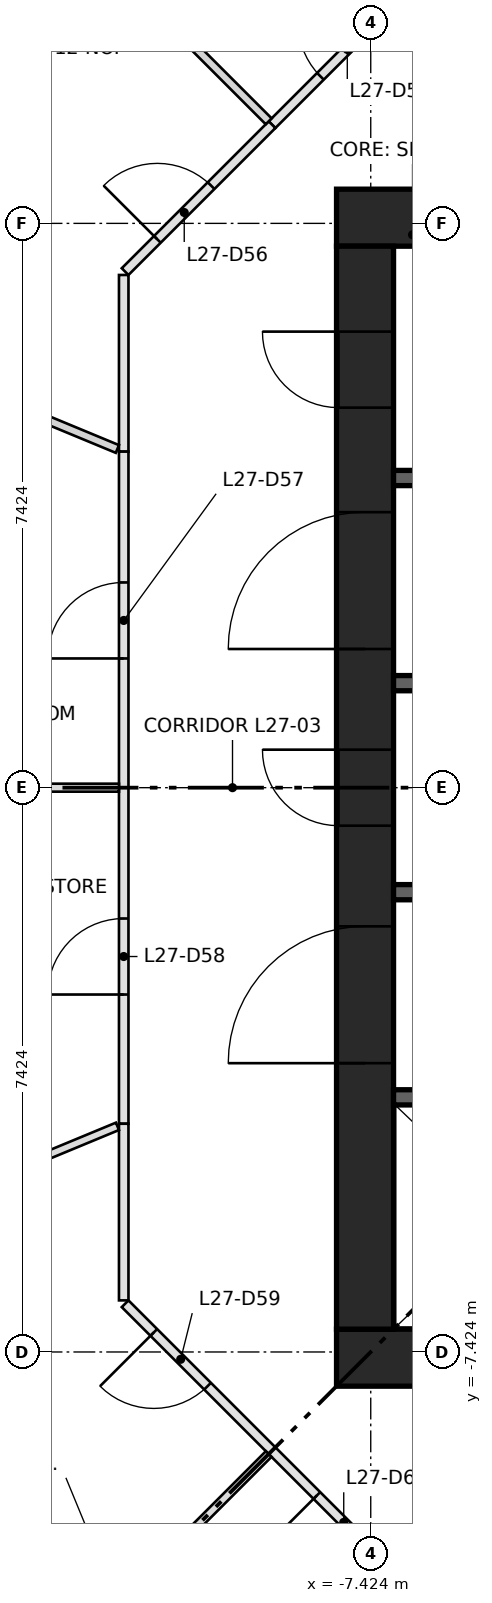
"""IFC4 building model, lengths in metres.
Left out: names, types, materials, properties, quantities, classifications, styles, units other than length and angle.
Written with IfcOpenShell. Run it as: python <this file> out.ifc"""

import sys

from ifc_helpers import new_model, si_unit, direction, frame, frame_2d, origin, place, context, subcontext, project, spatial, rectangle, extrude, element, fill, save


model = new_model("IFC4")
c1 = context("Model", 3, precision=1e-05, world=origin(), true_north=direction((0.0, 1.0)))
c2 = subcontext(c1, "Body", "Model", "MODEL_VIEW")
j1 = project(units=[si_unit("LENGTHUNIT", "METRE"), si_unit("PLANEANGLEUNIT", "RADIAN")], contexts=[c1])
p1 = place(None, origin())
s1 = spatial("IfcSite", under=j1, at=p1, CompositionType="ELEMENT")
p2 = place(p1, origin())
s2 = spatial("IfcBuilding", under=s1, at=p2, CompositionType="ELEMENT")
p3 = place(p2, frame((0.0, 0.0, 105.6)))
s3 = spatial("IfcBuildingStorey", under=s2, at=p3, CompositionType="ELEMENT", Elevation=105.6)
for number, where, z_axis, x_axis in (
    (1, (-7.874, -7.499, 0.0), (0.0, 0.0, 1.0), (1.0, 0.0, 0.0)),
    (2, (-7.874, 7.499, 0.0), (0.0, 0.0, 1.0), (1.0, 0.0, 0.0)),
):
    element("IfcWall", number, at=place(p3, frame(where, z_axis=z_axis, x_axis=x_axis)), inside=s3, PredefinedType="SHEAR", context=c2, shape_type="SweptSolid", body=[
        extrude(rectangle(XDim=15.748, YDim=0.75, at=frame_2d((7.874, 0.0))), origin(), (0.0, 0.0, 1.0), 3.65),
    ])
p4 = place(p3, frame((-7.499, -7.124, 0.0), z_axis=(0.0, 0.0, 1.0), x_axis=(0.0, 1.0, 0.0)))
e3 = element("IfcWall", 3, at=p4, inside=s3, PredefinedType="SHEAR", context=c2, shape_type="SweptSolid", body=[
    extrude(rectangle(XDim=14.248, YDim=0.75, at=frame_2d((7.124, 0.0))), origin(), (0.0, 0.0, 1.0), 3.65),
])
p5 = place(p4, frame((6.624, 0.0, 0.0)))
e4 = element("IfcOpeningElement", 4, at=p5, cuts=e3, PredefinedType="OPENING", context=c2, shape_type="SweptSolid", body=[
    extrude(rectangle(XDim=1.0, YDim=2.1, at=frame_2d((0.5, 1.05))), frame((0.0, 0.385, 0.0), z_axis=(0.0, -1.0, 0.0), x_axis=(1.0, 0.0, 0.0)), (0.0, 0.0, 1.0), 0.77),
])
p6 = place(p4, frame((3.5, 0.0, 0.0)))
e5 = element("IfcOpeningElement", 5, at=p6, cuts=e3, PredefinedType="OPENING", context=c2, shape_type="SweptSolid", body=[
    extrude(rectangle(XDim=1.8, YDim=2.1, at=frame_2d((0.9, 1.05))), frame((0.0, 0.385, 0.0), z_axis=(0.0, -1.0, 0.0), x_axis=(1.0, 0.0, 0.0)), (0.0, 0.0, 1.0), 0.77),
])
p7 = place(p4, frame((8.948, 0.0, 0.0)))
e6 = element("IfcOpeningElement", 6, at=p7, cuts=e3, PredefinedType="OPENING", context=c2, shape_type="SweptSolid", body=[
    extrude(rectangle(XDim=1.8, YDim=2.1, at=frame_2d((0.9, 1.05))), frame((0.0, 0.385, 0.0), z_axis=(0.0, -1.0, 0.0), x_axis=(1.0, 0.0, 0.0)), (0.0, 0.0, 1.0), 0.77),
])
p8 = place(p4, frame((12.124, 0.0, 0.0)))
e7 = element("IfcOpeningElement", 7, at=p8, cuts=e3, PredefinedType="OPENING", context=c2, shape_type="SweptSolid", body=[
    extrude(rectangle(XDim=1.0, YDim=2.1, at=frame_2d((0.5, 1.05))), frame((0.0, 0.385, 0.0), z_axis=(0.0, -1.0, 0.0), x_axis=(1.0, 0.0, 0.0)), (0.0, 0.0, 1.0), 0.77),
])
p9 = place(p3, frame((-7.124, -4.074, 0.0), z_axis=(0.0, 0.0, 1.0), x_axis=(1.0, 0.0, 0.0)))
e8 = element("IfcWall", 8, at=p9, inside=s3, PredefinedType="SHEAR", context=c2, shape_type="SweptSolid", body=[
    extrude(rectangle(XDim=14.248, YDim=0.2, at=frame_2d((7.124, 0.0))), origin(), (0.0, 0.0, 1.0), 3.3),
])
p10 = place(p9, frame((1.069, 0.0, 0.0)))
e9 = element("IfcOpeningElement", 9, at=p10, cuts=e8, PredefinedType="OPENING", context=c2, shape_type="SweptSolid", body=[
    extrude(rectangle(XDim=1.1, YDim=2.1, at=frame_2d((0.55, 1.05))), frame((0.0, 0.11, 0.0), z_axis=(0.0, -1.0, 0.0), x_axis=(1.0, 0.0, 0.0)), (0.0, 0.0, 1.0), 0.22),
])
p11 = place(p9, frame((4.206, 0.0, 0.0)))
e10 = element("IfcOpeningElement", 10, at=p11, cuts=e8, PredefinedType="OPENING", context=c2, shape_type="SweptSolid", body=[
    extrude(rectangle(XDim=1.1, YDim=2.1, at=frame_2d((0.55, 1.05))), frame((0.0, 0.11, 0.0), z_axis=(0.0, -1.0, 0.0), x_axis=(1.0, 0.0, 0.0)), (0.0, 0.0, 1.0), 0.22),
])
p12 = place(p9, frame((6.808, 0.0, 0.0)))
e11 = element("IfcOpeningElement", 11, at=p12, cuts=e8, PredefinedType="OPENING", context=c2, shape_type="SweptSolid", body=[
    extrude(rectangle(XDim=1.0, YDim=2.1, at=frame_2d((0.5, 1.05))), frame((0.0, 0.11, 0.0), z_axis=(0.0, -1.0, 0.0), x_axis=(1.0, 0.0, 0.0)), (0.0, 0.0, 1.0), 0.22),
])
p13 = place(p9, frame((8.777, 0.0, 0.0)))
e12 = element("IfcOpeningElement", 12, at=p13, cuts=e8, PredefinedType="OPENING", context=c2, shape_type="SweptSolid", body=[
    extrude(rectangle(XDim=1.0, YDim=2.1, at=frame_2d((0.5, 1.05))), frame((0.0, 0.11, 0.0), z_axis=(0.0, -1.0, 0.0), x_axis=(1.0, 0.0, 0.0)), (0.0, 0.0, 1.0), 0.22),
])
p14 = place(p9, frame((10.745, 0.0, 0.0)))
e13 = element("IfcOpeningElement", 13, at=p14, cuts=e8, PredefinedType="OPENING", context=c2, shape_type="SweptSolid", body=[
    extrude(rectangle(XDim=1.0, YDim=2.1, at=frame_2d((0.5, 1.05))), frame((0.0, 0.11, 0.0), z_axis=(0.0, -1.0, 0.0), x_axis=(1.0, 0.0, 0.0)), (0.0, 0.0, 1.0), 0.22),
])
p15 = place(p9, frame((12.714, 0.0, 0.0)))
e14 = element("IfcOpeningElement", 14, at=p15, cuts=e8, PredefinedType="OPENING", context=c2, shape_type="SweptSolid", body=[
    extrude(rectangle(XDim=1.0, YDim=2.1, at=frame_2d((0.5, 1.05))), frame((0.0, 0.11, 0.0), z_axis=(0.0, -1.0, 0.0), x_axis=(1.0, 0.0, 0.0)), (0.0, 0.0, 1.0), 0.22),
])
p16 = place(p3, frame((-7.124, 4.074, 0.0), z_axis=(0.0, 0.0, 1.0), x_axis=(1.0, 0.0, 0.0)))
e15 = element("IfcWall", 15, at=p16, inside=s3, PredefinedType="SHEAR", context=c2, shape_type="SweptSolid", body=[
    extrude(rectangle(XDim=7.124, YDim=0.2, at=frame_2d((3.562, 0.0))), origin(), (0.0, 0.0, 1.0), 3.3),
])
for number, where, z_axis, x_axis in (
    (16, (-7.124, -1.375, 0.0), (0.0, 0.0, 1.0), (1.0, 0.0, 0.0)),
    (17, (-7.124, 1.375, 0.0), (0.0, 0.0, 1.0), (1.0, 0.0, 0.0)),
):
    element("IfcWall", number, at=place(p3, frame(where, z_axis=z_axis, x_axis=x_axis)), inside=s3, PredefinedType="SHEAR", context=c2, shape_type="SweptSolid", body=[
        extrude(rectangle(XDim=2.75, YDim=0.2, at=frame_2d((1.375, 0.0))), origin(), (0.0, 0.0, 1.0), 3.3),
    ])
p17 = place(p3, frame((-8.722, 8.722, 0.0), z_axis=(0.0, 0.0, 1.0), x_axis=(0.707062130741, 0.707151428813, 0.0)))
e18 = element("IfcWall", 18, at=p17, inside=s3, PredefinedType="PARTITIONING", context=c2, shape_type="SweptSolid", body=[
    extrude(rectangle(XDim=2.734, YDim=0.125, at=frame_2d((1.367, 0.0))), origin(), (0.0, 0.0, 1.0), 3.3),
])
p18 = place(p17, frame((0.9, 0.0, 0.0)))
e19 = element("IfcOpeningElement", 19, at=p18, cuts=e18, PredefinedType="OPENING", context=c2, shape_type="SweptSolid", body=[
    extrude(rectangle(XDim=1.0, YDim=2.1, at=frame_2d((0.5, 1.05))), frame((0.0, 0.073, 0.0), z_axis=(0.0, -1.0, 0.0), x_axis=(1.0, 0.0, 0.0)), (0.0, 0.0, 1.0), 0.145),
])
p19 = place(p3, frame((-10.674, 4.421, 0.0), z_axis=(0.0, 0.0, 1.0), x_axis=(0.0, 1.0, 0.0)))
e20 = element("IfcWall", 20, at=p19, inside=s3, PredefinedType="PARTITIONING", context=c2, shape_type="SweptSolid", body=[
    extrude(rectangle(XDim=2.324, YDim=0.125, at=frame_2d((1.162, 0.0))), origin(), (0.0, 0.0, 1.0), 3.3),
])
p20 = place(p3, frame((-10.656, 6.789, 0.0), z_axis=(0.0, 0.0, 1.0), x_axis=(0.707151428813, 0.707062130741, 0.0)))
e21 = element("IfcWall", 21, at=p20, inside=s3, PredefinedType="PARTITIONING", context=c2, shape_type="SweptSolid", body=[
    extrude(rectangle(XDim=2.734, YDim=0.125, at=frame_2d((1.367, 0.0))), origin(), (0.0, 0.0, 1.0), 3.3),
])
p21 = place(p20, frame((0.6, 0.0, 0.0)))
e22 = element("IfcOpeningElement", 22, at=p21, cuts=e21, PredefinedType="OPENING", context=c2, shape_type="SweptSolid", body=[
    extrude(rectangle(XDim=1.0, YDim=2.1, at=frame_2d((0.5, 1.05))), frame((0.0, 0.073, 0.0), z_axis=(0.0, -1.0, 0.0), x_axis=(1.0, 0.0, 0.0)), (0.0, 0.0, 1.0), 0.145),
])
p22 = place(p3, frame((-10.674, 0.0, 0.0), z_axis=(0.0, 0.0, 1.0), x_axis=(0.0, 1.0, 0.0)))
e23 = element("IfcWall", 23, at=p22, inside=s3, PredefinedType="PARTITIONING", context=c2, shape_type="SweptSolid", body=[
    extrude(rectangle(XDim=4.421, YDim=0.125, at=frame_2d((2.211, 0.0))), origin(), (0.0, 0.0, 1.0), 3.3),
])
p23 = place(p22, frame((1.7, 0.0, 0.0)))
e24 = element("IfcOpeningElement", 24, at=p23, cuts=e23, PredefinedType="OPENING", context=c2, shape_type="SweptSolid", body=[
    extrude(rectangle(XDim=1.0, YDim=2.1, at=frame_2d((0.5, 1.05))), frame((0.0, 0.073, 0.0), z_axis=(0.0, -1.0, 0.0), x_axis=(1.0, 0.0, 0.0)), (0.0, 0.0, 1.0), 0.145),
])
p24 = place(p3, frame((-10.674, -4.421, 0.0), z_axis=(0.0, 0.0, 1.0), x_axis=(0.0, 1.0, 0.0)))
e25 = element("IfcWall", 25, at=p24, inside=s3, PredefinedType="PARTITIONING", context=c2, shape_type="SweptSolid", body=[
    extrude(rectangle(XDim=4.421, YDim=0.125, at=frame_2d((2.211, 0.0))), origin(), (0.0, 0.0, 1.0), 3.3),
])
p25 = place(p24, frame((1.7, 0.0, 0.0)))
e26 = element("IfcOpeningElement", 26, at=p25, cuts=e25, PredefinedType="OPENING", context=c2, shape_type="SweptSolid", body=[
    extrude(rectangle(XDim=1.0, YDim=2.1, at=frame_2d((0.5, 1.05))), frame((0.0, 0.073, 0.0), z_axis=(0.0, -1.0, 0.0), x_axis=(1.0, 0.0, 0.0)), (0.0, 0.0, 1.0), 0.145),
])
p26 = place(p3, frame((-10.674, -6.745, 0.0), z_axis=(0.0, 0.0, 1.0), x_axis=(0.0, 1.0, 0.0)))
e27 = element("IfcWall", 27, at=p26, inside=s3, PredefinedType="PARTITIONING", context=c2, shape_type="SweptSolid", body=[
    extrude(rectangle(XDim=2.324, YDim=0.125, at=frame_2d((1.162, 0.0))), origin(), (0.0, 0.0, 1.0), 3.3),
])
p27 = place(p3, frame((-8.722, -8.722, 0.0), z_axis=(0.0, 0.0, 1.0), x_axis=(-0.707151428813, 0.707062130741, 0.0)))
e28 = element("IfcWall", 28, at=p27, inside=s3, PredefinedType="PARTITIONING", context=c2, shape_type="SweptSolid", body=[
    extrude(rectangle(XDim=2.734, YDim=0.125, at=frame_2d((1.367, 0.0))), origin(), (0.0, 0.0, 1.0), 3.3),
])
p28 = place(p27, frame((1.2, 0.0, 0.0)))
e29 = element("IfcOpeningElement", 29, at=p28, cuts=e28, PredefinedType="OPENING", context=c2, shape_type="SweptSolid", body=[
    extrude(rectangle(XDim=1.0, YDim=2.1, at=frame_2d((0.5, 1.05))), frame((0.0, 0.073, 0.0), z_axis=(0.0, -1.0, 0.0), x_axis=(1.0, 0.0, 0.0)), (0.0, 0.0, 1.0), 0.145),
])
p29 = place(p3, frame((-6.789, -10.656, 0.0), z_axis=(0.0, 0.0, 1.0), x_axis=(-0.707062130741, 0.707151428813, 0.0)))
e30 = element("IfcWall", 30, at=p29, inside=s3, PredefinedType="PARTITIONING", context=c2, shape_type="SweptSolid", body=[
    extrude(rectangle(XDim=2.734, YDim=0.125, at=frame_2d((1.367, 0.0))), origin(), (0.0, 0.0, 1.0), 3.3),
])
p30 = place(p29, frame((0.9, 0.0, 0.0)))
e31 = element("IfcOpeningElement", 31, at=p30, cuts=e30, PredefinedType="OPENING", context=c2, shape_type="SweptSolid", body=[
    extrude(rectangle(XDim=1.0, YDim=2.1, at=frame_2d((0.5, 1.05))), frame((0.0, 0.073, 0.0), z_axis=(0.0, -1.0, 0.0), x_axis=(1.0, 0.0, 0.0)), (0.0, 0.0, 1.0), 0.145),
])
p31 = place(p3, frame((-8.767, 8.767, 0.0), z_axis=(0.0, 0.0, 1.0), x_axis=(-0.707106781187, 0.707106781187, 0.0)))
e32 = element("IfcWall", 32, at=p31, inside=s3, PredefinedType="PARTITIONING", context=c2, shape_type="SweptSolid", body=[
    extrude(rectangle(XDim=5.602, YDim=0.11, at=frame_2d((2.801, 0.0))), origin(), (0.0, 0.0, 1.0), 3.3),
])
p32 = place(p3, frame((-10.758, 4.456, 0.0), z_axis=(0.0, 0.0, 1.0), x_axis=(-0.923844847366, 0.382767158983, 0.0)))
e33 = element("IfcWall", 33, at=p32, inside=s3, PredefinedType="PARTITIONING", context=c2, shape_type="SweptSolid", body=[
    extrude(rectangle(XDim=1.886, YDim=0.11, at=frame_2d((0.943, 0.0))), origin(), (0.0, 0.0, 1.0), 3.3),
])
p33 = place(p3, frame((-10.737, 0.0, 0.0), z_axis=(0.0, 0.0, 1.0), x_axis=(-1.0, 0.0, 0.0)))
e34 = element("IfcWall", 34, at=p33, inside=s3, PredefinedType="PARTITIONING", context=c2, shape_type="SweptSolid", body=[
    extrude(rectangle(XDim=2.735, YDim=0.105, at=frame_2d((1.367, 0.0))), origin(), (0.0, 0.0, 1.0), 3.3),
])
p34 = place(p3, frame((-10.757, -4.456, 0.0), z_axis=(0.0, 0.0, 1.0), x_axis=(-0.923874914803, -0.382694580309, 0.0)))
e35 = element("IfcWall", 35, at=p34, inside=s3, PredefinedType="PARTITIONING", context=c2, shape_type="SweptSolid", body=[
    extrude(rectangle(XDim=1.887, YDim=0.105, at=frame_2d((0.943, 0.0))), origin(), (0.0, 0.0, 1.0), 3.3),
])
p35 = place(p3, frame((-12.728, -12.728, 0.0), z_axis=(0.0, 0.0, 1.0), x_axis=(0.707106781187, 0.707106781187, 0.0)))
e36 = element("IfcWall", 36, at=p35, inside=s3, PredefinedType="PARTITIONING", context=c2, shape_type="SweptSolid", body=[
    extrude(rectangle(XDim=5.602, YDim=0.105, at=frame_2d((2.801, 0.0))), origin(), (0.0, 0.0, 1.0), 3.3),
])
p36 = place(p5, origin())
e37 = element("IfcDoor", 37, at=p36, inside=s3, OperationType="SINGLE_SWING_RIGHT", PredefinedType="DOOR", context=c2, shape_type="SweptSolid", body=[
    extrude(rectangle(XDim=1.0, YDim=2.1, at=frame_2d((0.5, 1.05))), frame((0.0, 0.375, 0.0), z_axis=(0.0, -1.0, 0.0), x_axis=(1.0, 0.0, 0.0)), (0.0, 0.0, 1.0), 0.05),
])
fill(e4, e37)
p37 = place(p6, origin())
e38 = element("IfcDoor", 38, at=p37, inside=s3, OperationType="DOUBLE_DOOR_SINGLE_SWING", PredefinedType="DOOR", context=c2, shape_type="SweptSolid", body=[
    extrude(rectangle(XDim=1.8, YDim=2.1, at=frame_2d((0.9, 1.05))), frame((0.0, 0.025, 0.0), z_axis=(0.0, -1.0, 0.0), x_axis=(1.0, 0.0, 0.0)), (0.0, 0.0, 1.0), 0.05),
])
fill(e5, e38)
p38 = place(p7, origin())
e39 = element("IfcDoor", 39, at=p38, inside=s3, OperationType="DOUBLE_DOOR_SINGLE_SWING", PredefinedType="DOOR", context=c2, shape_type="SweptSolid", body=[
    extrude(rectangle(XDim=1.8, YDim=2.1, at=frame_2d((0.9, 1.05))), frame((0.0, 0.025, 0.0), z_axis=(0.0, -1.0, 0.0), x_axis=(1.0, 0.0, 0.0)), (0.0, 0.0, 1.0), 0.05),
])
fill(e6, e39)
p39 = place(p8, origin())
e40 = element("IfcDoor", 40, at=p39, inside=s3, OperationType="SINGLE_SWING_RIGHT", PredefinedType="DOOR", context=c2, shape_type="SweptSolid", body=[
    extrude(rectangle(XDim=1.0, YDim=2.1, at=frame_2d((0.5, 1.05))), frame((0.0, 0.375, 0.0), z_axis=(0.0, -1.0, 0.0), x_axis=(1.0, 0.0, 0.0)), (0.0, 0.0, 1.0), 0.05),
])
fill(e7, e40)
p40 = place(p18, origin())
e41 = element("IfcDoor", 41, at=p40, inside=s3, OperationType="SINGLE_SWING_RIGHT", PredefinedType="DOOR", context=c2, shape_type="SweptSolid", body=[
    extrude(rectangle(XDim=1.0, YDim=2.1, at=frame_2d((0.5, 1.05))), frame((0.0, 0.025, 0.0), z_axis=(0.0, -1.0, 0.0), x_axis=(1.0, 0.0, 0.0)), (0.0, 0.0, 1.0), 0.05),
])
fill(e19, e41)
p41 = place(p21, origin())
e42 = element("IfcDoor", 42, at=p41, inside=s3, OperationType="SINGLE_SWING_LEFT", PredefinedType="DOOR", context=c2, shape_type="SweptSolid", body=[
    extrude(rectangle(XDim=1.0, YDim=2.1, at=frame_2d((0.5, 1.05))), frame((0.0, 0.025, 0.0), z_axis=(0.0, -1.0, 0.0), x_axis=(1.0, 0.0, 0.0)), (0.0, 0.0, 1.0), 0.05),
])
fill(e22, e42)
p42 = place(p23, origin())
e43 = element("IfcDoor", 43, at=p42, inside=s3, OperationType="SINGLE_SWING_LEFT", PredefinedType="DOOR", context=c2, shape_type="SweptSolid", body=[
    extrude(rectangle(XDim=1.0, YDim=2.1, at=frame_2d((0.5, 1.05))), frame((0.0, 0.025, 0.0), z_axis=(0.0, -1.0, 0.0), x_axis=(1.0, 0.0, 0.0)), (0.0, 0.0, 1.0), 0.05),
])
fill(e24, e43)
p43 = place(p25, origin())
e44 = element("IfcDoor", 44, at=p43, inside=s3, OperationType="SINGLE_SWING_LEFT", PredefinedType="DOOR", context=c2, shape_type="SweptSolid", body=[
    extrude(rectangle(XDim=1.0, YDim=2.1, at=frame_2d((0.5, 1.05))), frame((0.0, 0.025, 0.0), z_axis=(0.0, -1.0, 0.0), x_axis=(1.0, 0.0, 0.0)), (0.0, 0.0, 1.0), 0.05),
])
fill(e26, e44)
p44 = place(p28, origin())
e45 = element("IfcDoor", 45, at=p44, inside=s3, OperationType="SINGLE_SWING_RIGHT", PredefinedType="DOOR", context=c2, shape_type="SweptSolid", body=[
    extrude(rectangle(XDim=1.0, YDim=2.1, at=frame_2d((0.5, 1.05))), frame((0.0, 0.025, 0.0), z_axis=(0.0, -1.0, 0.0), x_axis=(1.0, 0.0, 0.0)), (0.0, 0.0, 1.0), 0.05),
])
fill(e29, e45)
p45 = place(p30, origin())
e46 = element("IfcDoor", 46, at=p45, inside=s3, OperationType="SINGLE_SWING_RIGHT", PredefinedType="DOOR", context=c2, shape_type="SweptSolid", body=[
    extrude(rectangle(XDim=1.0, YDim=2.1, at=frame_2d((0.5, 1.05))), frame((0.0, 0.025, 0.0), z_axis=(0.0, -1.0, 0.0), x_axis=(1.0, 0.0, 0.0)), (0.0, 0.0, 1.0), 0.05),
])
fill(e31, e46)
save(model, sys.argv[1])
